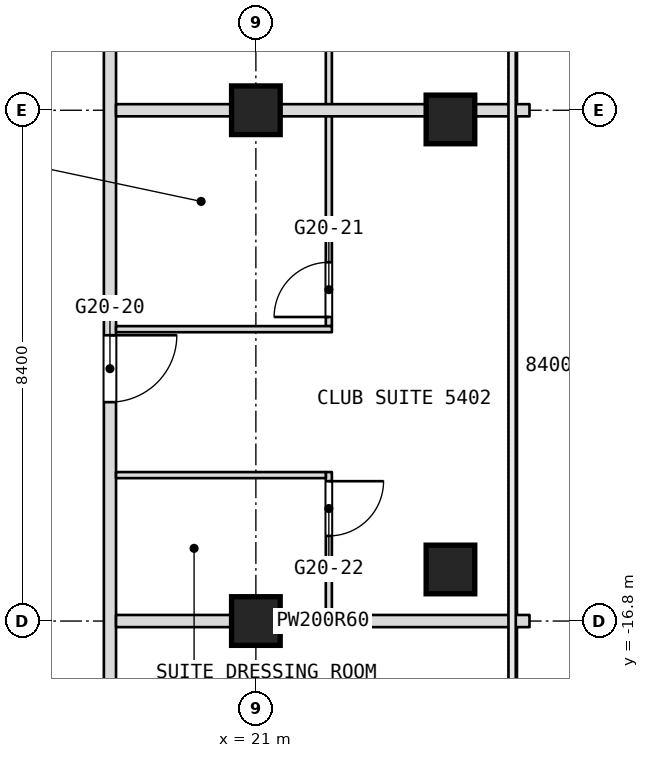
"""IFC4 building model, lengths in metres.
Left out: names, types, materials, properties, quantities, classifications, styles, units other than length and angle.
Written with IfcOpenShell. Run it as: python <this file> out.ifc"""

import sys

from ifc_helpers import new_model, si_unit, direction, frame, frame_2d, origin, origin_2d, place, context, subcontext, project, spatial, rectangle, extrude, element, fill, save


model = new_model("IFC4")
c1 = context("Model", 3, precision=1e-05, world=origin(), true_north=direction((0.0, 1.0)))
c2 = subcontext(c1, "Body", "Model", "MODEL_VIEW")
j1 = project(units=[si_unit("LENGTHUNIT", "METRE"), si_unit("PLANEANGLEUNIT", "RADIAN")], contexts=[c1])
p1 = place(None, origin())
s1 = spatial("IfcSite", under=j1, at=p1, CompositionType="ELEMENT")
p2 = place(p1, origin())
s2 = spatial("IfcBuilding", under=s1, at=p2, CompositionType="ELEMENT")
p3 = place(p2, frame((0.0, 0.0, 230.9)))
s3 = spatial("IfcBuildingStorey", under=s2, at=p3, CompositionType="ELEMENT", Elevation=230.9)
for number, where, z_axis, x_axis in (
    (1, (21.0, -16.8, 0.0), (0.0, 0.0, 1.0), (1.0, 0.0, 0.0)),
    (2, (21.0, -8.4, 0.0), (0.0, 0.0, 1.0), (1.0, 0.0, 0.0)),
    (3, (24.2, -8.551, 0.0), (0.0, 0.0, 1.0), (1.0, 0.0, 0.0)),
    (4, (24.2, -15.952, 0.0), (0.0, 0.0, 1.0), (1.0, 0.0, 0.0)),
):
    element("IfcColumn", number, at=place(p3, frame(where, z_axis=z_axis, x_axis=x_axis)), inside=s3, PredefinedType="COLUMN", context=c2, shape_type="SweptSolid", body=[
        extrude(rectangle(XDim=0.8, YDim=0.8, at=origin_2d()), origin(), (0.0, 0.0, 1.0), 3.6),
    ])
p4 = place(p3, frame((22.2, -16.7, 0.0), z_axis=(0.0, 0.0, 1.0), x_axis=(0.0, 1.0, 0.0)))
e5 = element("IfcWall", 5, at=p4, inside=s3, PredefinedType="PARTITIONING", context=c2, shape_type="SweptSolid", body=[
    extrude(rectangle(XDim=2.35, YDim=0.1, at=frame_2d((1.175, 0.0))), origin(), (0.0, 0.0, 1.0), 3.34),
])
p5 = place(p4, frame((1.3, 0.0, 0.0)))
e6 = element("IfcOpeningElement", 6, at=p5, cuts=e5, PredefinedType="OPENING", context=c2, shape_type="SweptSolid", body=[
    extrude(rectangle(XDim=0.9, YDim=2.1, at=frame_2d((0.45, 1.05))), frame((0.0, 0.05, 0.0), z_axis=(0.0, -1.0, 0.0), x_axis=(1.0, 0.0, 0.0)), (0.0, 0.0, 1.0), 0.1),
])
p6 = place(p3, frame((22.2, -11.95, 0.0), z_axis=(0.0, 0.0, 1.0), x_axis=(0.0, 1.0, 0.0)))
e7 = element("IfcWall", 7, at=p6, inside=s3, PredefinedType="PARTITIONING", context=c2, shape_type="SweptSolid", body=[
    extrude(rectangle(XDim=7.2, YDim=0.1, at=frame_2d((3.6, 0.0))), origin(), (0.0, 0.0, 1.0), 3.34),
])
p7 = place(p6, frame((0.15, 0.0, 0.0)))
e8 = element("IfcOpeningElement", 8, at=p7, cuts=e7, PredefinedType="OPENING", context=c2, shape_type="SweptSolid", body=[
    extrude(rectangle(XDim=0.9, YDim=2.1, at=frame_2d((0.45, 1.05))), frame((0.0, 0.05, 0.0), z_axis=(0.0, -1.0, 0.0), x_axis=(1.0, 0.0, 0.0)), (0.0, 0.0, 1.0), 0.1),
])
p8 = place(p6, frame((6.15, 0.0, 0.0)))
e9 = element("IfcOpeningElement", 9, at=p8, cuts=e7, PredefinedType="OPENING", context=c2, shape_type="SweptSolid", body=[
    extrude(rectangle(XDim=0.9, YDim=2.1, at=frame_2d((0.45, 1.05))), frame((0.0, 0.05, 0.0), z_axis=(0.0, -1.0, 0.0), x_axis=(1.0, 0.0, 0.0)), (0.0, 0.0, 1.0), 0.1),
])
p9 = place(p3, frame((18.6, -26.751, 0.0), z_axis=(0.0, 0.0, 1.0), x_axis=(0.0, 1.0, 0.0)))
e10 = element("IfcWall", 10, at=p9, inside=s3, PredefinedType="PARTITIONING", context=c2, shape_type="SweptSolid", body=[
    extrude(rectangle(XDim=49.091, YDim=0.2, at=frame_2d((24.545, 0.0))), origin(), (0.0, 0.0, 1.0), 3.34),
])
p10 = place(p9, frame((6.988, 0.0, 0.0)))
e11 = element("IfcOpeningElement", 11, at=p10, cuts=e10, PredefinedType="OPENING", context=c2, shape_type="SweptSolid", body=[
    extrude(rectangle(XDim=1.1, YDim=2.1, at=frame_2d((0.55, 1.05))), frame((0.0, 0.1, 0.0), z_axis=(0.0, -1.0, 0.0), x_axis=(1.0, 0.0, 0.0)), (0.0, 0.0, 1.0), 0.2),
])
p11 = place(p9, frame((13.551, 0.0, 0.0)))
e12 = element("IfcOpeningElement", 12, at=p11, cuts=e10, PredefinedType="OPENING", context=c2, shape_type="SweptSolid", body=[
    extrude(rectangle(XDim=1.1, YDim=2.1, at=frame_2d((0.55, 1.05))), frame((0.0, 0.1, 0.0), z_axis=(0.0, -1.0, 0.0), x_axis=(1.0, 0.0, 0.0)), (0.0, 0.0, 1.0), 0.2),
])
p12 = place(p9, frame((22.051, 0.0, 0.0)))
e13 = element("IfcOpeningElement", 13, at=p12, cuts=e10, PredefinedType="OPENING", context=c2, shape_type="SweptSolid", body=[
    extrude(rectangle(XDim=1.1, YDim=2.1, at=frame_2d((0.55, 1.05))), frame((0.0, 0.1, 0.0), z_axis=(0.0, -1.0, 0.0), x_axis=(1.0, 0.0, 0.0)), (0.0, 0.0, 1.0), 0.2),
])
p13 = place(p9, frame((28.301, 0.0, 0.0)))
e14 = element("IfcOpeningElement", 14, at=p13, cuts=e10, PredefinedType="OPENING", context=c2, shape_type="SweptSolid", body=[
    extrude(rectangle(XDim=1.1, YDim=2.1, at=frame_2d((0.55, 1.05))), frame((0.0, 0.1, 0.0), z_axis=(0.0, -1.0, 0.0), x_axis=(1.0, 0.0, 0.0)), (0.0, 0.0, 1.0), 0.2),
])
p14 = place(p9, frame((37.951, 0.0, 0.0)))
e15 = element("IfcOpeningElement", 15, at=p14, cuts=e10, PredefinedType="OPENING", context=c2, shape_type="SweptSolid", body=[
    extrude(rectangle(XDim=1.0, YDim=2.1, at=frame_2d((0.5, 1.05))), frame((0.0, 0.1, 0.0), z_axis=(0.0, -1.0, 0.0), x_axis=(1.0, 0.0, 0.0)), (0.0, 0.0, 1.0), 0.2),
])
p15 = place(p9, frame((39.751, 0.0, 0.0)))
e16 = element("IfcOpeningElement", 16, at=p15, cuts=e10, PredefinedType="OPENING", context=c2, shape_type="SweptSolid", body=[
    extrude(rectangle(XDim=1.0, YDim=2.1, at=frame_2d((0.5, 1.05))), frame((0.0, 0.1, 0.0), z_axis=(0.0, -1.0, 0.0), x_axis=(1.0, 0.0, 0.0)), (0.0, 0.0, 1.0), 0.2),
])
p16 = place(p9, frame((44.051, 0.0, 0.0)))
e17 = element("IfcOpeningElement", 17, at=p16, cuts=e10, PredefinedType="OPENING", context=c2, shape_type="SweptSolid", body=[
    extrude(rectangle(XDim=1.0, YDim=2.1, at=frame_2d((0.5, 1.05))), frame((0.0, 0.1, 0.0), z_axis=(0.0, -1.0, 0.0), x_axis=(1.0, 0.0, 0.0)), (0.0, 0.0, 1.0), 0.2),
])
p17 = place(p3, frame((18.7, -16.8, 0.0), z_axis=(0.0, 0.0, 1.0), x_axis=(1.0, 0.0, 0.0)))
e18 = element("IfcWall", 18, at=p17, inside=s3, PredefinedType="PARTITIONING", context=c2, shape_type="SweptSolid", body=[
    extrude(rectangle(XDim=6.8, YDim=0.2, at=frame_2d((3.4, 0.0))), origin(), (0.0, 0.0, 1.0), 2.94),
])
p18 = place(p3, frame((18.7, -14.4, 0.0), z_axis=(0.0, 0.0, 1.0), x_axis=(1.0, 0.0, 0.0)))
e19 = element("IfcWall", 19, at=p18, inside=s3, PredefinedType="PARTITIONING", context=c2, shape_type="SweptSolid", body=[
    extrude(rectangle(XDim=3.45, YDim=0.1, at=frame_2d((1.725, 0.0))), origin(), (0.0, 0.0, 1.0), 3.34),
])
p19 = place(p3, frame((18.7, -12.0, 0.0), z_axis=(0.0, 0.0, 1.0), x_axis=(1.0, 0.0, 0.0)))
e20 = element("IfcWall", 20, at=p19, inside=s3, PredefinedType="PARTITIONING", context=c2, shape_type="SweptSolid", body=[
    extrude(rectangle(XDim=3.55, YDim=0.1, at=frame_2d((1.775, 0.0))), origin(), (0.0, 0.0, 1.0), 3.34),
])
p20 = place(p3, frame((18.7, -8.4, 0.0), z_axis=(0.0, 0.0, 1.0), x_axis=(1.0, 0.0, 0.0)))
e21 = element("IfcWall", 21, at=p20, inside=s3, PredefinedType="PARTITIONING", context=c2, shape_type="SweptSolid", body=[
    extrude(rectangle(XDim=6.8, YDim=0.2, at=frame_2d((3.4, 0.0))), origin(), (0.0, 0.0, 1.0), 2.94),
])
p21 = place(p5, origin())
e22 = element("IfcDoor", 22, at=p21, inside=s3, OperationType="SINGLE_SWING_RIGHT", PredefinedType="DOOR", context=c2, shape_type="SweptSolid", body=[
    extrude(rectangle(XDim=0.9, YDim=2.1, at=frame_2d((0.45, 1.05))), frame((0.0, 0.025, 0.0), z_axis=(0.0, -1.0, 0.0), x_axis=(1.0, 0.0, 0.0)), (0.0, 0.0, 1.0), 0.05),
])
fill(e6, e22)
p22 = place(p7, origin())
e23 = element("IfcDoor", 23, at=p22, inside=s3, OperationType="SINGLE_SWING_LEFT", PredefinedType="DOOR", context=c2, shape_type="SweptSolid", body=[
    extrude(rectangle(XDim=0.9, YDim=2.1, at=frame_2d((0.45, 1.05))), frame((0.0, 0.025, 0.0), z_axis=(0.0, -1.0, 0.0), x_axis=(1.0, 0.0, 0.0)), (0.0, 0.0, 1.0), 0.05),
])
fill(e8, e23)
p23 = place(p11, origin())
e24 = element("IfcDoor", 24, at=p23, inside=s3, OperationType="SINGLE_SWING_LEFT", PredefinedType="DOOR", context=c2, shape_type="SweptSolid", body=[
    extrude(rectangle(XDim=1.1, YDim=2.1, at=frame_2d((0.55, 1.05))), frame((0.0, 0.025, 0.0), z_axis=(0.0, -1.0, 0.0), x_axis=(1.0, 0.0, 0.0)), (0.0, 0.0, 1.0), 0.05),
])
fill(e12, e24)
save(model, sys.argv[1])
